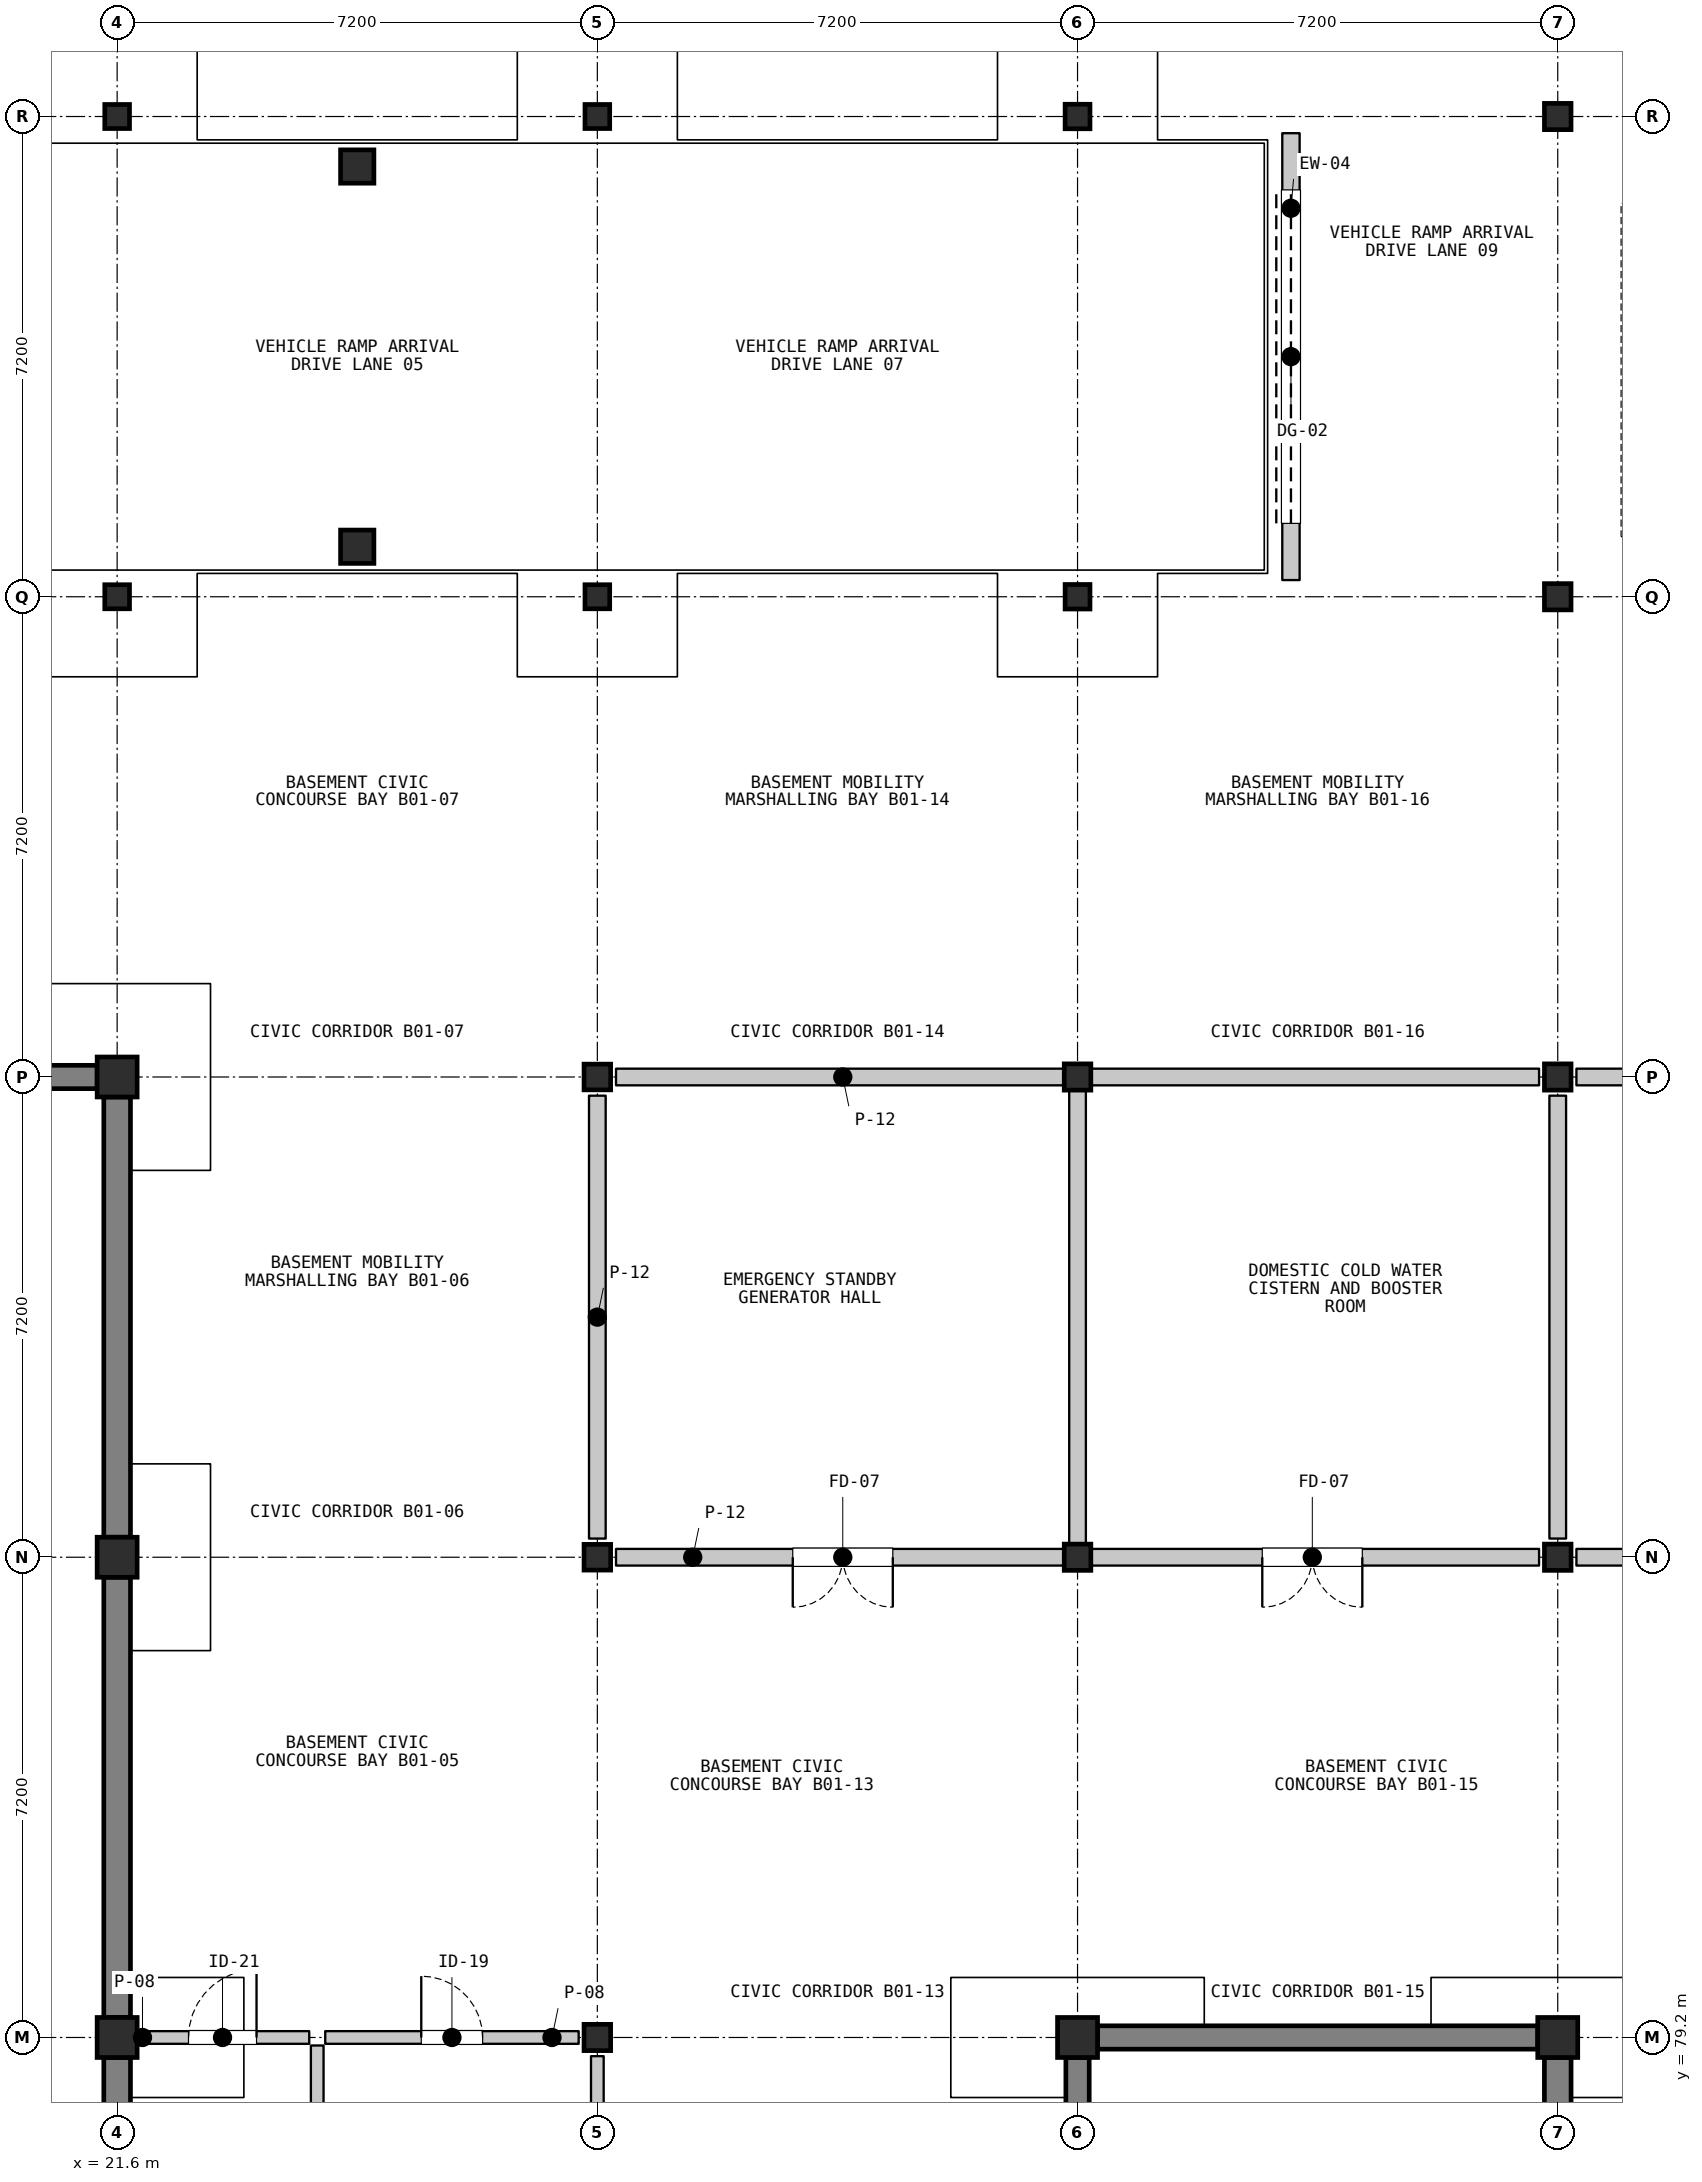
"""IFC4 building model, lengths in metres.
Left out: names, types, materials, properties, quantities, classifications, styles, units other than length and angle.
Written with IfcOpenShell. Run it as: python <this file> out.ifc"""

import sys

from ifc_helpers import new_model, si_unit, direction, frame, frame_2d, origin, origin_2d, place, context, subcontext, project, spatial, rectangle, i_section, extrude, element, fill, save


model = new_model("IFC4")
c1 = context("Model", 3, precision=1e-05, world=origin(), true_north=direction((0.0, 1.0)))
c2 = subcontext(c1, "Body", "Model", "MODEL_VIEW")
j1 = project(units=[si_unit("LENGTHUNIT", "METRE"), si_unit("PLANEANGLEUNIT", "RADIAN")], contexts=[c1])
p1 = place(None, origin())
s1 = spatial("IfcSite", under=j1, at=p1, CompositionType="ELEMENT")
p2 = place(p1, origin())
s2 = spatial("IfcBuilding", under=s1, at=p2, CompositionType="ELEMENT")
p3 = place(p2, frame((0.0, 0.0, -4.2)))
s3 = spatial("IfcBuildingStorey", under=s2, at=p3, CompositionType="ELEMENT", Elevation=-4.2)
p4 = place(p3, frame((14.7, 93.6, 0.0), z_axis=(0.0, 0.0, 1.0), x_axis=(1.0, 0.0, 0.0)))
e1 = element("IfcWall", 1, at=p4, inside=s3, PredefinedType="USERDEFINED", context=c2, shape_type="SweptSolid", body=[
    extrude(rectangle(XDim=6.6, YDim=0.35, at=frame_2d((3.3, 0.0))), origin(), (0.0, 0.0, 1.0), 3.98),
])
p5 = place(p3, frame((21.6, 72.3, 0.0), z_axis=(0.0, 0.0, 1.0), x_axis=(0.0, 1.0, 0.0)))
e2 = element("IfcWall", 2, at=p5, inside=s3, PredefinedType="USERDEFINED", context=c2, shape_type="SweptSolid", body=[
    extrude(rectangle(XDim=6.6, YDim=0.4, at=frame_2d((3.3, 0.0))), origin(), (0.0, 0.0, 1.0), 3.98),
])
for number, where, z_axis, x_axis in (
    (3, (21.6, 79.5, 0.0), (0.0, 0.0, 1.0), (0.0, 1.0, 0.0)),
    (4, (21.6, 86.7, 0.0), (0.0, 0.0, 1.0), (0.0, 1.0, 0.0)),
):
    element("IfcWall", number, at=place(p3, frame(where, z_axis=z_axis, x_axis=x_axis)), inside=s3, PredefinedType="USERDEFINED", context=c2, shape_type="SweptSolid", body=[
        extrude(rectangle(XDim=6.6, YDim=0.4, at=frame_2d((3.3, 0.0))), origin(), (0.0, 0.0, 1.0), 3.98),
    ])
for number, where, z_axis, x_axis in (
    (5, (36.0, 72.3, 0.0), (0.0, 0.0, 1.0), (0.0, 1.0, 0.0)),
    (6, (36.3, 79.2, 0.0), (0.0, 0.0, 1.0), (1.0, 0.0, 0.0)),
):
    element("IfcWall", number, at=place(p3, frame(where, z_axis=z_axis, x_axis=x_axis)), inside=s3, PredefinedType="USERDEFINED", context=c2, shape_type="SweptSolid", body=[
        extrude(rectangle(XDim=6.6, YDim=0.35, at=frame_2d((3.3, 0.0))), origin(), (0.0, 0.0, 1.0), 3.98),
    ])
p6 = place(p3, frame((43.2, 72.3, 0.0), z_axis=(0.0, 0.0, 1.0), x_axis=(0.0, 1.0, 0.0)))
e7 = element("IfcWall", 7, at=p6, inside=s3, PredefinedType="USERDEFINED", context=c2, shape_type="SweptSolid", body=[
    extrude(rectangle(XDim=6.6, YDim=0.4, at=frame_2d((3.3, 0.0))), origin(), (0.0, 0.0, 1.0), 3.98),
])
for number, where, z_axis, x_axis in (
    (8, (21.6, 79.2, 0.0), (0.0, 0.0, 1.0), (1.0, 0.0, 0.0)),
    (9, (21.6, 86.4, 0.0), (0.0, 0.0, 1.0), (1.0, 0.0, 0.0)),
    (10, (21.6, 93.6, 0.0), (0.0, 0.0, 1.0), (1.0, 0.0, 0.0)),
):
    element("IfcColumn", number, at=place(p3, frame(where, z_axis=z_axis, x_axis=x_axis)), inside=s3, PredefinedType="COLUMN", context=c2, shape_type="SweptSolid", body=[
        extrude(rectangle(XDim=0.6, YDim=0.6, at=origin_2d()), origin(), (0.0, 0.0, 1.0), 4.2),
    ])
for number, where, z_axis, x_axis in (
    (11, (21.6, 100.8, 0.0), (0.0, 0.0, 1.0), (1.0, 0.0, 0.0)),
    (12, (21.6, 108.0, 0.0), (0.0, 0.0, 1.0), (1.0, 0.0, 0.0)),
):
    element("IfcColumn", number, at=place(p3, frame(where, z_axis=z_axis, x_axis=x_axis)), inside=s3, PredefinedType="COLUMN", context=c2, shape_type="SweptSolid", body=[
        extrude(i_section(OverallWidth=0.371, OverallDepth=0.361, WebThickness=0.012, FlangeThickness=0.02, FilletRadius=0.015, at=origin_2d()), origin(), (0.0, 0.0, 1.0), 4.2),
    ])
p7 = place(p3, frame((28.8, 79.2, 0.0), z_axis=(0.0, 0.0, 1.0), x_axis=(1.0, 0.0, 0.0)))
e13 = element("IfcColumn", 13, at=p7, inside=s3, PredefinedType="COLUMN", context=c2, shape_type="SweptSolid", body=[
    extrude(i_section(OverallWidth=0.399, OverallDepth=0.394, WebThickness=0.023, FlangeThickness=0.037, FilletRadius=0.015, at=origin_2d()), origin(), (0.0, 0.0, 1.0), 4.2),
])
for number, where, z_axis, x_axis in (
    (14, (28.8, 86.4, 0.0), (0.0, 0.0, 1.0), (1.0, 0.0, 0.0)),
    (15, (28.8, 93.6, 0.0), (0.0, 0.0, 1.0), (1.0, 0.0, 0.0)),
):
    element("IfcColumn", number, at=place(p3, frame(where, z_axis=z_axis, x_axis=x_axis)), inside=s3, PredefinedType="COLUMN", context=c2, shape_type="SweptSolid", body=[
        extrude(i_section(OverallWidth=0.399, OverallDepth=0.386, WebThickness=0.021, FlangeThickness=0.033, FilletRadius=0.015, at=origin_2d()), origin(), (0.0, 0.0, 1.0), 4.2),
    ])
for number, where, z_axis, x_axis in (
    (16, (28.8, 100.8, 0.0), (0.0, 0.0, 1.0), (1.0, 0.0, 0.0)),
    (17, (28.8, 108.0, 0.0), (0.0, 0.0, 1.0), (1.0, 0.0, 0.0)),
):
    element("IfcColumn", number, at=place(p3, frame(where, z_axis=z_axis, x_axis=x_axis)), inside=s3, PredefinedType="COLUMN", context=c2, shape_type="SweptSolid", body=[
        extrude(i_section(OverallWidth=0.371, OverallDepth=0.361, WebThickness=0.012, FlangeThickness=0.02, FilletRadius=0.015, at=origin_2d()), origin(), (0.0, 0.0, 1.0), 4.2),
    ])
p8 = place(p3, frame((36.0, 79.2, 0.0), z_axis=(0.0, 0.0, 1.0), x_axis=(1.0, 0.0, 0.0)))
e18 = element("IfcColumn", 18, at=p8, inside=s3, PredefinedType="COLUMN", context=c2, shape_type="SweptSolid", body=[
    extrude(rectangle(XDim=0.6, YDim=0.6, at=origin_2d()), origin(), (0.0, 0.0, 1.0), 4.2),
])
for number, where, z_axis, x_axis in (
    (19, (36.0, 86.4, 0.0), (0.0, 0.0, 1.0), (1.0, 0.0, 0.0)),
    (20, (36.0, 93.6, 0.0), (0.0, 0.0, 1.0), (1.0, 0.0, 0.0)),
):
    element("IfcColumn", number, at=place(p3, frame(where, z_axis=z_axis, x_axis=x_axis)), inside=s3, PredefinedType="COLUMN", context=c2, shape_type="SweptSolid", body=[
        extrude(i_section(OverallWidth=0.399, OverallDepth=0.394, WebThickness=0.023, FlangeThickness=0.037, FilletRadius=0.015, at=origin_2d()), origin(), (0.0, 0.0, 1.0), 4.2),
    ])
for number, where, z_axis, x_axis in (
    (21, (36.0, 100.8, 0.0), (0.0, 0.0, 1.0), (1.0, 0.0, 0.0)),
    (22, (36.0, 108.0, 0.0), (0.0, 0.0, 1.0), (1.0, 0.0, 0.0)),
):
    element("IfcColumn", number, at=place(p3, frame(where, z_axis=z_axis, x_axis=x_axis)), inside=s3, PredefinedType="COLUMN", context=c2, shape_type="SweptSolid", body=[
        extrude(i_section(OverallWidth=0.373, OverallDepth=0.368, WebThickness=0.015, FlangeThickness=0.024, FilletRadius=0.015, at=origin_2d()), origin(), (0.0, 0.0, 1.0), 4.2),
    ])
p9 = place(p3, frame((43.2, 79.2, 0.0), z_axis=(0.0, 0.0, 1.0), x_axis=(1.0, 0.0, 0.0)))
e23 = element("IfcColumn", 23, at=p9, inside=s3, PredefinedType="COLUMN", context=c2, shape_type="SweptSolid", body=[
    extrude(rectangle(XDim=0.6, YDim=0.6, at=origin_2d()), origin(), (0.0, 0.0, 1.0), 4.2),
])
for number, where, z_axis, x_axis in (
    (24, (43.2, 86.4, 0.0), (0.0, 0.0, 1.0), (1.0, 0.0, 0.0)),
    (25, (43.2, 93.6, 0.0), (0.0, 0.0, 1.0), (1.0, 0.0, 0.0)),
    (26, (43.2, 100.8, 0.0), (0.0, 0.0, 1.0), (1.0, 0.0, 0.0)),
    (27, (43.2, 108.0, 0.0), (0.0, 0.0, 1.0), (1.0, 0.0, 0.0)),
):
    element("IfcColumn", number, at=place(p3, frame(where, z_axis=z_axis, x_axis=x_axis)), inside=s3, PredefinedType="COLUMN", context=c2, shape_type="SweptSolid", body=[
        extrude(i_section(OverallWidth=0.399, OverallDepth=0.394, WebThickness=0.023, FlangeThickness=0.037, FilletRadius=0.015, at=origin_2d()), origin(), (0.0, 0.0, 1.0), 4.2),
    ])
for number, where, z_axis, x_axis in (
    (28, (25.2, 101.55, 0.0), (0.0, 0.0, 1.0), (1.0, 0.0, 0.0)),
    (29, (25.2, 107.25, 0.0), (0.0, 0.0, 1.0), (1.0, 0.0, 0.0)),
):
    element("IfcColumn", number, at=place(p3, frame(where, z_axis=z_axis, x_axis=x_axis)), inside=s3, PredefinedType="COLUMN", context=c2, shape_type="SweptSolid", body=[
        extrude(rectangle(XDim=0.5, YDim=0.5, at=origin_2d()), origin(), (0.0, 0.0, 1.0), 0.698),
    ])
p10 = place(p3, frame((39.2, 101.05, 0.0), z_axis=(0.0, 0.0, 1.0), x_axis=(0.0, 1.0, 0.0)))
e30 = element("IfcWall", 30, at=p10, inside=s3, PredefinedType="SOLIDWALL", context=c2, shape_type="SweptSolid", body=[
    extrude(rectangle(XDim=6.7, YDim=0.26, at=frame_2d((3.35, 0.0))), origin(), (0.0, 0.0, 1.0), 3.22),
])
p11 = place(p10, frame((0.85, 0.0, 0.0)))
e31 = element("IfcOpeningElement", 31, at=p11, cuts=e30, PredefinedType="OPENING", context=c2, shape_type="SweptSolid", body=[
    extrude(rectangle(XDim=5.0, YDim=2.8, at=frame_2d((2.5, 1.4))), frame((0.0, 0.14, 0.0), z_axis=(0.0, -1.0, 0.0), x_axis=(1.0, 0.0, 0.0)), (0.0, 0.0, 1.0), 0.28),
])
p12 = place(p3, frame((21.88, 79.2, 0.0), z_axis=(0.0, 0.0, 1.0), x_axis=(1.0, 0.0, 0.0)))
e32 = element("IfcWall", 32, at=p12, inside=s3, PredefinedType="PARTITIONING", context=c2, shape_type="SweptSolid", body=[
    extrude(rectangle(XDim=2.6, YDim=0.19, at=frame_2d((1.3, 0.0))), origin(), (0.0, 0.0, 1.0), 3.368),
])
p13 = place(p12, frame((0.79, 0.0, 0.0)))
e33 = element("IfcOpeningElement", 33, at=p13, cuts=e32, PredefinedType="OPENING", context=c2, shape_type="SweptSolid", body=[
    extrude(rectangle(XDim=1.02, YDim=2.15, at=frame_2d((0.51, 1.075))), frame((0.0, 0.105, 0.0), z_axis=(0.0, -1.0, 0.0), x_axis=(1.0, 0.0, 0.0)), (0.0, 0.0, 1.0), 0.21),
])
p14 = place(p3, frame((24.6, 79.08, 0.0), z_axis=(0.0, 0.0, 1.0), x_axis=(0.0, -1.0, 0.0)))
e34 = element("IfcWall", 34, at=p14, inside=s3, PredefinedType="PARTITIONING", context=c2, shape_type="SweptSolid", body=[
    extrude(rectangle(XDim=6.96, YDim=0.19, at=frame_2d((3.48, 0.0))), origin(), (0.0, 0.0, 1.0), 3.368),
])
p15 = place(p3, frame((24.72, 79.2, 0.0), z_axis=(0.0, 0.0, 1.0), x_axis=(1.0, 0.0, 0.0)))
e35 = element("IfcWall", 35, at=p15, inside=s3, PredefinedType="PARTITIONING", context=c2, shape_type="SweptSolid", body=[
    extrude(rectangle(XDim=3.8, YDim=0.19, at=frame_2d((1.9, 0.0))), origin(), (0.0, 0.0, 1.0), 3.368),
])
p16 = place(p15, frame((1.44, 0.0, 0.0)))
e36 = element("IfcOpeningElement", 36, at=p16, cuts=e35, PredefinedType="OPENING", context=c2, shape_type="SweptSolid", body=[
    extrude(rectangle(XDim=0.92, YDim=2.1, at=frame_2d((0.46, 1.05))), frame((0.0, 0.105, 0.0), z_axis=(0.0, -1.0, 0.0), x_axis=(1.0, 0.0, 0.0)), (0.0, 0.0, 1.0), 0.21),
])
p17 = place(p3, frame((28.8, 78.92, 0.0), z_axis=(0.0, 0.0, 1.0), x_axis=(0.0, -1.0, 0.0)))
e37 = element("IfcWall", 37, at=p17, inside=s3, PredefinedType="PARTITIONING", context=c2, shape_type="SweptSolid", body=[
    extrude(rectangle(XDim=6.8, YDim=0.19, at=frame_2d((3.4, 0.0))), origin(), (0.0, 0.0, 1.0), 3.368),
])
p18 = place(p3, frame((35.88, 86.4, 0.0), z_axis=(0.0, 0.0, 1.0), x_axis=(-1.0, 0.0, 0.0)))
e38 = element("IfcWall", 38, at=p18, inside=s3, PredefinedType="PARTITIONING", context=c2, shape_type="SweptSolid", body=[
    extrude(rectangle(XDim=6.8, YDim=0.25, at=frame_2d((3.4, 0.0))), origin(), (0.0, 0.0, 1.0), 3.368),
])
p19 = place(p18, frame((2.65, 0.0, 0.0)))
e39 = element("IfcOpeningElement", 39, at=p19, cuts=e38, PredefinedType="OPENING", context=c2, shape_type="SweptSolid", body=[
    extrude(rectangle(XDim=1.5, YDim=2.25, at=frame_2d((0.75, 1.125))), frame((0.0, 0.135, 0.0), z_axis=(0.0, -1.0, 0.0), x_axis=(1.0, 0.0, 0.0)), (0.0, 0.0, 1.0), 0.27),
])
p20 = place(p3, frame((29.08, 93.6, 0.0), z_axis=(0.0, 0.0, 1.0), x_axis=(1.0, 0.0, 0.0)))
e40 = element("IfcWall", 40, at=p20, inside=s3, PredefinedType="PARTITIONING", context=c2, shape_type="SweptSolid", body=[
    extrude(rectangle(XDim=6.8, YDim=0.25, at=frame_2d((3.4, 0.0))), origin(), (0.0, 0.0, 1.0), 3.368),
])
p21 = place(p3, frame((28.8, 86.68, 0.0), z_axis=(0.0, 0.0, 1.0), x_axis=(0.0, 1.0, 0.0)))
e41 = element("IfcWall", 41, at=p21, inside=s3, PredefinedType="PARTITIONING", context=c2, shape_type="SweptSolid", body=[
    extrude(rectangle(XDim=6.64, YDim=0.25, at=frame_2d((3.32, 0.0))), origin(), (0.0, 0.0, 1.0), 3.437),
])
p22 = place(p3, frame((36.0, 93.48, 0.0), z_axis=(0.0, 0.0, 1.0), x_axis=(0.0, -1.0, 0.0)))
e42 = element("IfcWall", 42, at=p22, inside=s3, PredefinedType="PARTITIONING", context=c2, shape_type="SweptSolid", body=[
    extrude(rectangle(XDim=6.96, YDim=0.25, at=frame_2d((3.48, 0.0))), origin(), (0.0, 0.0, 1.0), 3.368),
])
p23 = place(p3, frame((42.92, 86.4, 0.0), z_axis=(0.0, 0.0, 1.0), x_axis=(-1.0, 0.0, 0.0)))
e43 = element("IfcWall", 43, at=p23, inside=s3, PredefinedType="PARTITIONING", context=c2, shape_type="SweptSolid", body=[
    extrude(rectangle(XDim=6.8, YDim=0.25, at=frame_2d((3.4, 0.0))), origin(), (0.0, 0.0, 1.0), 3.368),
])
p24 = place(p23, frame((2.65, 0.0, 0.0)))
e44 = element("IfcOpeningElement", 44, at=p24, cuts=e43, PredefinedType="OPENING", context=c2, shape_type="SweptSolid", body=[
    extrude(rectangle(XDim=1.5, YDim=2.25, at=frame_2d((0.75, 1.125))), frame((0.0, 0.135, 0.0), z_axis=(0.0, -1.0, 0.0), x_axis=(1.0, 0.0, 0.0)), (0.0, 0.0, 1.0), 0.27),
])
p25 = place(p3, frame((36.12, 93.6, 0.0), z_axis=(0.0, 0.0, 1.0), x_axis=(1.0, 0.0, 0.0)))
e45 = element("IfcWall", 45, at=p25, inside=s3, PredefinedType="PARTITIONING", context=c2, shape_type="SweptSolid", body=[
    extrude(rectangle(XDim=6.8, YDim=0.25, at=frame_2d((3.4, 0.0))), origin(), (0.0, 0.0, 1.0), 3.368),
])
p26 = place(p3, frame((43.2, 93.32, 0.0), z_axis=(0.0, 0.0, 1.0), x_axis=(0.0, -1.0, 0.0)))
e46 = element("IfcWall", 46, at=p26, inside=s3, PredefinedType="PARTITIONING", context=c2, shape_type="SweptSolid", body=[
    extrude(rectangle(XDim=6.64, YDim=0.25, at=frame_2d((3.32, 0.0))), origin(), (0.0, 0.0, 1.0), 3.437),
])
p27 = place(p3, frame((50.28, 86.4, 0.0), z_axis=(0.0, 0.0, 1.0), x_axis=(-1.0, 0.0, 0.0)))
e47 = element("IfcWall", 47, at=p27, inside=s3, PredefinedType="PARTITIONING", context=c2, shape_type="SweptSolid", body=[
    extrude(rectangle(XDim=6.8, YDim=0.25, at=frame_2d((3.4, 0.0))), origin(), (0.0, 0.0, 1.0), 3.368),
])
p28 = place(p27, frame((2.65, 0.0, 0.0)))
e48 = element("IfcOpeningElement", 48, at=p28, cuts=e47, PredefinedType="OPENING", context=c2, shape_type="SweptSolid", body=[
    extrude(rectangle(XDim=1.5, YDim=2.25, at=frame_2d((0.75, 1.125))), frame((0.0, 0.135, 0.0), z_axis=(0.0, -1.0, 0.0), x_axis=(1.0, 0.0, 0.0)), (0.0, 0.0, 1.0), 0.27),
])
p29 = place(p3, frame((43.48, 93.6, 0.0), z_axis=(0.0, 0.0, 1.0), x_axis=(1.0, 0.0, 0.0)))
e49 = element("IfcWall", 49, at=p29, inside=s3, PredefinedType="PARTITIONING", context=c2, shape_type="SweptSolid", body=[
    extrude(rectangle(XDim=6.8, YDim=0.25, at=frame_2d((3.4, 0.0))), origin(), (0.0, 0.0, 1.0), 3.368),
])
p30 = place(p11, origin())
e50 = element("IfcDoor", 50, at=p30, inside=s3, OperationType="ROLLINGUP", PredefinedType="GATE", context=c2, shape_type="SweptSolid", body=[
    extrude(rectangle(XDim=5.0, YDim=2.8, at=frame_2d((2.5, 1.4))), frame((0.0, 0.025, 0.0), z_axis=(0.0, -1.0, 0.0), x_axis=(1.0, 0.0, 0.0)), (0.0, 0.0, 1.0), 0.05),
])
fill(e31, e50)
p31 = place(p13, origin())
e51 = element("IfcDoor", 51, at=p31, inside=s3, OperationType="SINGLE_SWING_RIGHT", PredefinedType="DOOR", context=c2, shape_type="SweptSolid", body=[
    extrude(rectangle(XDim=1.02, YDim=2.15, at=frame_2d((0.51, 1.075))), frame((0.0, 0.025, 0.0), z_axis=(0.0, -1.0, 0.0), x_axis=(1.0, 0.0, 0.0)), (0.0, 0.0, 1.0), 0.05),
])
fill(e33, e51)
p32 = place(p16, origin())
e52 = element("IfcDoor", 52, at=p32, inside=s3, OperationType="SINGLE_SWING_LEFT", PredefinedType="DOOR", context=c2, shape_type="SweptSolid", body=[
    extrude(rectangle(XDim=0.92, YDim=2.1, at=frame_2d((0.46, 1.05))), frame((0.0, 0.025, 0.0), z_axis=(0.0, -1.0, 0.0), x_axis=(1.0, 0.0, 0.0)), (0.0, 0.0, 1.0), 0.05),
])
fill(e36, e52)
p33 = place(p19, origin())
e53 = element("IfcDoor", 53, at=p33, inside=s3, OperationType="DOUBLE_DOOR_SINGLE_SWING", PredefinedType="DOOR", context=c2, shape_type="SweptSolid", body=[
    extrude(rectangle(XDim=1.5, YDim=2.25, at=frame_2d((0.75, 1.125))), frame((0.0, 0.025, 0.0), z_axis=(0.0, -1.0, 0.0), x_axis=(1.0, 0.0, 0.0)), (0.0, 0.0, 1.0), 0.05),
])
fill(e39, e53)
p34 = place(p24, origin())
e54 = element("IfcDoor", 54, at=p34, inside=s3, OperationType="DOUBLE_DOOR_SINGLE_SWING", PredefinedType="DOOR", context=c2, shape_type="SweptSolid", body=[
    extrude(rectangle(XDim=1.5, YDim=2.25, at=frame_2d((0.75, 1.125))), frame((0.0, 0.025, 0.0), z_axis=(0.0, -1.0, 0.0), x_axis=(1.0, 0.0, 0.0)), (0.0, 0.0, 1.0), 0.05),
])
fill(e44, e54)
save(model, sys.argv[1])
